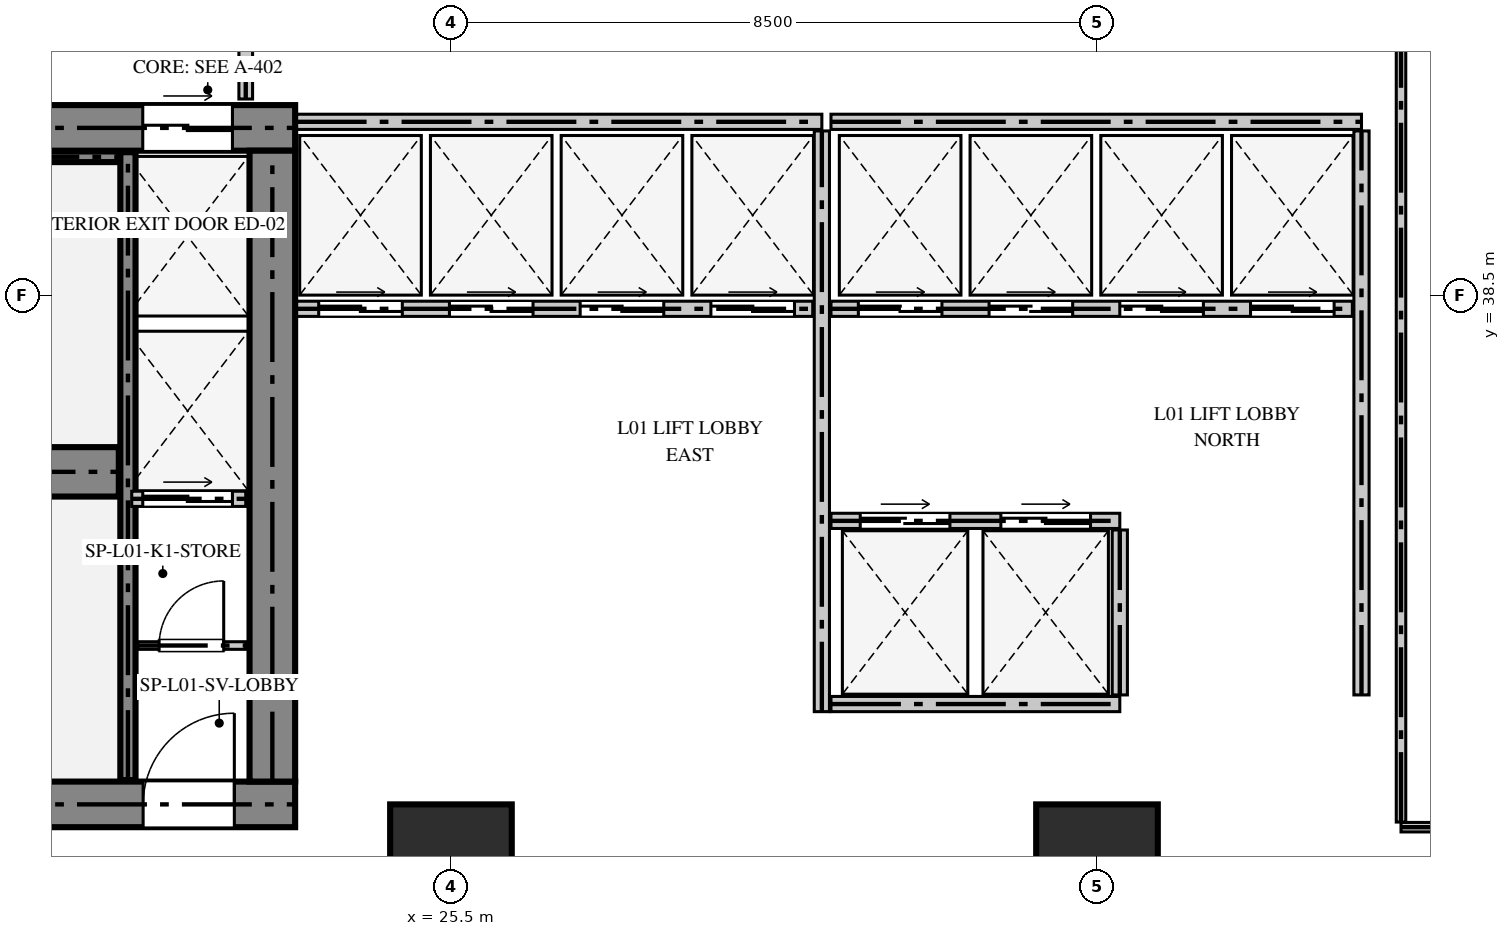
"""IFC4 building model, lengths in metres.
Left out: names, types, materials, properties, quantities, classifications, styles, units other than length and angle.
Written with IfcOpenShell. Run it as: python <this file> out.ifc"""

import sys

from ifc_helpers import new_model, si_unit, direction, frame, frame_2d, origin, origin_2d, place, context, subcontext, project, spatial, rectangle, extrude, element, fill, save


model = new_model("IFC4")
c1 = context("Model", 3, precision=1e-05, world=origin(), true_north=direction((0.0, 1.0)))
c2 = subcontext(c1, "Body", "Model", "MODEL_VIEW")
j1 = project(units=[si_unit("LENGTHUNIT", "METRE"), si_unit("PLANEANGLEUNIT", "RADIAN")], contexts=[c1])
p1 = place(None, origin())
s1 = spatial("IfcSite", under=j1, at=p1, CompositionType="ELEMENT")
p2 = place(p1, origin())
s2 = spatial("IfcBuilding", under=s1, at=p2, CompositionType="ELEMENT")
p3 = place(p2, origin())
s3 = spatial("IfcBuildingStorey", under=s2, at=p3, CompositionType="ELEMENT", Elevation=0.0)
p4 = place(p3, frame((5.4, 40.7, 0.0), z_axis=(0.0, 0.0, 1.0), x_axis=(1.0, 0.0, 0.0)))
e1 = element("IfcWall", 1, at=p4, inside=s3, PredefinedType="SHEAR", context=c2, shape_type="SweptSolid", body=[
    extrude(rectangle(XDim=18.05, YDim=0.6, at=frame_2d((9.025, 0.0))), origin(), (0.0, 0.0, 1.0), 5.4),
])
p5 = place(p4, frame((8.82, 0.0, 0.0)))
e2 = element("IfcOpeningElement", 2, at=p5, cuts=e1, PredefinedType="OPENING", context=c2, shape_type="SweptSolid", body=[
    extrude(rectangle(XDim=1.15, YDim=2.2, at=frame_2d((0.575, 1.1))), frame((0.0, 0.31, 0.0), z_axis=(0.0, -1.0, 0.0), x_axis=(1.0, 0.0, 0.0)), (0.0, 0.0, 1.0), 0.62),
])
p6 = place(p4, frame((16.045, 0.0, 0.0)))
e3 = element("IfcOpeningElement", 3, at=p6, cuts=e1, PredefinedType="OPENING", context=c2, shape_type="SweptSolid", body=[
    extrude(rectangle(XDim=1.18, YDim=2.25, at=frame_2d((0.59, 1.125))), frame((0.0, 0.31, 0.0), z_axis=(0.0, -1.0, 0.0), x_axis=(1.0, 0.0, 0.0)), (0.0, 0.0, 1.0), 0.62),
])
p7 = place(p3, frame((5.4, 31.8, 0.0), z_axis=(0.0, 0.0, 1.0), x_axis=(1.0, 0.0, 0.0)))
e4 = element("IfcWall", 4, at=p7, inside=s3, PredefinedType="SHEAR", context=c2, shape_type="SweptSolid", body=[
    extrude(rectangle(XDim=18.05, YDim=0.6, at=frame_2d((9.025, 0.0))), origin(), (0.0, 0.0, 1.0), 5.4),
])
p8 = place(p7, frame((3.25, 0.0, 0.0)))
e5 = element("IfcOpeningElement", 5, at=p8, cuts=e4, PredefinedType="OPENING", context=c2, shape_type="SweptSolid", body=[
    extrude(rectangle(XDim=1.2, YDim=2.2, at=frame_2d((0.6, 1.1))), frame((0.0, 0.31, 0.0), z_axis=(0.0, -1.0, 0.0), x_axis=(1.0, 0.0, 0.0)), (0.0, 0.0, 1.0), 0.62),
])
p9 = place(p7, frame((7.1, 0.0, 0.0)))
e6 = element("IfcOpeningElement", 6, at=p9, cuts=e4, PredefinedType="OPENING", context=c2, shape_type="SweptSolid", body=[
    extrude(rectangle(XDim=1.2, YDim=2.2, at=frame_2d((0.6, 1.1))), frame((0.0, 0.31, 0.0), z_axis=(0.0, -1.0, 0.0), x_axis=(1.0, 0.0, 0.0)), (0.0, 0.0, 1.0), 0.62),
])
p10 = place(p7, frame((8.95, 0.0, 0.0)))
e7 = element("IfcOpeningElement", 7, at=p10, cuts=e4, PredefinedType="OPENING", context=c2, shape_type="SweptSolid", body=[
    extrude(rectangle(XDim=1.15, YDim=2.2, at=frame_2d((0.575, 1.1))), frame((0.0, 0.31, 0.0), z_axis=(0.0, -1.0, 0.0), x_axis=(1.0, 0.0, 0.0)), (0.0, 0.0, 1.0), 0.62),
])
p11 = place(p7, frame((16.05, 0.0, 0.0)))
e8 = element("IfcOpeningElement", 8, at=p11, cuts=e4, PredefinedType="OPENING", context=c2, shape_type="SweptSolid", body=[
    extrude(rectangle(XDim=1.2, YDim=2.2, at=frame_2d((0.6, 1.1))), frame((0.0, 0.31, 0.0), z_axis=(0.0, -1.0, 0.0), x_axis=(1.0, 0.0, 0.0)), (0.0, 0.0, 1.0), 0.62),
])
p12 = place(p3, frame((23.15, 32.1, 0.0), z_axis=(0.0, 0.0, 1.0), x_axis=(0.0, 1.0, 0.0)))
e9 = element("IfcWall", 9, at=p12, inside=s3, PredefinedType="SHEAR", context=c2, shape_type="SweptSolid", body=[
    extrude(rectangle(XDim=8.3, YDim=0.6, at=frame_2d((4.15, 0.0))), origin(), (0.0, 0.0, 1.0), 5.4),
])
p13 = place(p3, frame((14.12, 36.175, 0.0), z_axis=(0.0, 0.0, 1.0), x_axis=(1.0, 0.0, 0.0)))
e10 = element("IfcWall", 10, at=p13, inside=s3, PredefinedType="SHEAR", context=c2, shape_type="SweptSolid", body=[
    extrude(rectangle(XDim=7.01, YDim=0.65, at=frame_2d((3.505, 0.0))), origin(), (0.0, 0.0, 1.0), 5.4),
])
p14 = place(p3, frame((21.25, 32.12, 0.0), z_axis=(0.0, 0.0, 1.0), x_axis=(0.0, 1.0, 0.0)))
e11 = element("IfcWall", 11, at=p14, inside=s3, PredefinedType="SHEAR", context=c2, shape_type="SweptSolid", body=[
    extrude(rectangle(XDim=8.26, YDim=0.2, at=frame_2d((4.13, 0.0))), origin(), (0.0, 0.0, 1.0), 5.4),
])
p15 = place(p3, frame((15.55, 40.32, 0.0), z_axis=(0.0, 0.0, 1.0), x_axis=(1.0, 0.0, 0.0)))
e12 = element("IfcWall", 12, at=p15, inside=s3, PredefinedType="SHEAR", context=c2, shape_type="SweptSolid", body=[
    extrude(rectangle(XDim=5.58, YDim=0.14, at=frame_2d((2.79, 0.0))), origin(), (0.0, 0.0, 1.0), 5.4),
])
for number, where, z_axis, x_axis in (
    (13, (25.5, 31.0, 0.0), (0.0, 0.0, 1.0), (1.0, 0.0, 0.0)),
    (14, (34.0, 31.0, 0.0), (0.0, 0.0, 1.0), (1.0, 0.0, 0.0)),
):
    element("IfcColumn", number, at=place(p3, frame(where, z_axis=z_axis, x_axis=x_axis)), inside=s3, PredefinedType="COLUMN", context=c2, shape_type="SweptSolid", body=[
        extrude(rectangle(XDim=1.6, YDim=1.6, at=origin_2d()), origin(), (0.0, 0.0, 1.0), 5.4),
    ])
p16 = place(p3, frame((21.38, 33.89, 0.0), z_axis=(0.0, 0.0, 1.0), x_axis=(1.0, 0.0, 0.0)))
e15 = element("IfcWall", 15, at=p16, inside=s3, PredefinedType="PARTITIONING", context=c2, shape_type="SweptSolid", body=[
    extrude(rectangle(XDim=1.42, YDim=0.1, at=frame_2d((0.71, 0.0))), origin(), (0.0, 0.0, 1.0), 5.08),
])
p17 = place(p16, frame((0.28, 0.0, 0.0)))
e16 = element("IfcOpeningElement", 16, at=p17, cuts=e15, PredefinedType="OPENING", context=c2, shape_type="SweptSolid", body=[
    extrude(rectangle(XDim=0.85, YDim=2.1, at=frame_2d((0.425, 1.05))), frame((0.0, 0.06, 0.0), z_axis=(0.0, -1.0, 0.0), x_axis=(1.0, 0.0, 0.0)), (0.0, 0.0, 1.0), 0.12),
])
p18 = place(p3, frame((21.3, 35.82, 0.0), z_axis=(0.0, 0.0, 1.0), x_axis=(1.0, 0.0, 0.0)))
e17 = element("IfcWall", 17, at=p18, inside=s3, PredefinedType="PARTITIONING", context=c2, shape_type="SweptSolid", body=[
    extrude(rectangle(XDim=1.5, YDim=0.2, at=frame_2d((0.75, 0.0))), origin(), (0.0, 0.0, 1.0), 5.08),
])
p19 = place(p18, frame((0.145, 0.0, 0.0)))
e18 = element("IfcOpeningElement", 18, at=p19, cuts=e17, PredefinedType="OPENING", context=c2, shape_type="SweptSolid", body=[
    extrude(rectangle(XDim=1.18, YDim=2.25, at=frame_2d((0.59, 1.125))), frame((0.0, 0.11, 0.0), z_axis=(0.0, -1.0, 0.0), x_axis=(1.0, 0.0, 0.0)), (0.0, 0.0, 1.0), 0.22),
])
p20 = place(p3, frame((23.47, 40.78, 0.0), z_axis=(0.0, 0.0, 1.0), x_axis=(1.0, 0.0, 0.0)))
e19 = element("IfcWall", 19, at=p20, inside=s3, PredefinedType="PARTITIONING", context=c2, shape_type="SweptSolid", body=[
    extrude(rectangle(XDim=6.91, YDim=0.2, at=frame_2d((3.455, 0.0))), origin(), (0.0, 0.0, 1.0), 5.08),
])
p21 = place(p3, frame((30.38, 33.02, 0.0), z_axis=(0.0, 0.0, 1.0), x_axis=(0.0, 1.0, 0.0)))
e20 = element("IfcWall", 20, at=p21, inside=s3, PredefinedType="PARTITIONING", context=c2, shape_type="SweptSolid", body=[
    extrude(rectangle(XDim=7.64, YDim=0.2, at=frame_2d((3.82, 0.0))), origin(), (0.0, 0.0, 1.0), 5.08),
])
p22 = place(p3, frame((23.47, 38.32, 0.0), z_axis=(0.0, 0.0, 1.0), x_axis=(1.0, 0.0, 0.0)))
e21 = element("IfcWall", 21, at=p22, inside=s3, PredefinedType="PARTITIONING", context=c2, shape_type="SweptSolid", body=[
    extrude(rectangle(XDim=6.79, YDim=0.2, at=frame_2d((3.395, 0.0))), origin(), (0.0, 0.0, 1.0), 5.08),
])
p23 = place(p22, frame((0.29, 0.0, 0.0)))
e22 = element("IfcOpeningElement", 22, at=p23, cuts=e21, PredefinedType="OPENING", context=c2, shape_type="SweptSolid", body=[
    extrude(rectangle(XDim=1.1, YDim=2.2, at=frame_2d((0.55, 1.1))), frame((0.0, 0.11, 0.0), z_axis=(0.0, -1.0, 0.0), x_axis=(1.0, 0.0, 0.0)), (0.0, 0.0, 1.0), 0.22),
])
p24 = place(p22, frame((2.01, 0.0, 0.0)))
e23 = element("IfcOpeningElement", 23, at=p24, cuts=e21, PredefinedType="OPENING", context=c2, shape_type="SweptSolid", body=[
    extrude(rectangle(XDim=1.1, YDim=2.2, at=frame_2d((0.55, 1.1))), frame((0.0, 0.11, 0.0), z_axis=(0.0, -1.0, 0.0), x_axis=(1.0, 0.0, 0.0)), (0.0, 0.0, 1.0), 0.22),
])
p25 = place(p22, frame((3.73, 0.0, 0.0)))
e24 = element("IfcOpeningElement", 24, at=p25, cuts=e21, PredefinedType="OPENING", context=c2, shape_type="SweptSolid", body=[
    extrude(rectangle(XDim=1.1, YDim=2.2, at=frame_2d((0.55, 1.1))), frame((0.0, 0.11, 0.0), z_axis=(0.0, -1.0, 0.0), x_axis=(1.0, 0.0, 0.0)), (0.0, 0.0, 1.0), 0.22),
])
p26 = place(p22, frame((5.45, 0.0, 0.0)))
e25 = element("IfcOpeningElement", 25, at=p26, cuts=e21, PredefinedType="OPENING", context=c2, shape_type="SweptSolid", body=[
    extrude(rectangle(XDim=1.1, YDim=2.2, at=frame_2d((0.55, 1.1))), frame((0.0, 0.11, 0.0), z_axis=(0.0, -1.0, 0.0), x_axis=(1.0, 0.0, 0.0)), (0.0, 0.0, 1.0), 0.22),
])
p27 = place(p3, frame((30.5, 40.78, 0.0), z_axis=(0.0, 0.0, 1.0), x_axis=(1.0, 0.0, 0.0)))
e26 = element("IfcWall", 26, at=p27, inside=s3, PredefinedType="PARTITIONING", context=c2, shape_type="SweptSolid", body=[
    extrude(rectangle(XDim=6.98, YDim=0.2, at=frame_2d((3.49, 0.0))), origin(), (0.0, 0.0, 1.0), 5.08),
])
p28 = place(p3, frame((37.48, 33.24, 0.0), z_axis=(0.0, 0.0, 1.0), x_axis=(0.0, 1.0, 0.0)))
e27 = element("IfcWall", 27, at=p28, inside=s3, PredefinedType="PARTITIONING", context=c2, shape_type="SweptSolid", body=[
    extrude(rectangle(XDim=7.42, YDim=0.2, at=frame_2d((3.71, 0.0))), origin(), (0.0, 0.0, 1.0), 5.08),
])
p29 = place(p3, frame((30.5, 38.32, 0.0), z_axis=(0.0, 0.0, 1.0), x_axis=(1.0, 0.0, 0.0)))
e28 = element("IfcWall", 28, at=p29, inside=s3, PredefinedType="PARTITIONING", context=c2, shape_type="SweptSolid", body=[
    extrude(rectangle(XDim=6.86, YDim=0.2, at=frame_2d((3.43, 0.0))), origin(), (0.0, 0.0, 1.0), 5.08),
])
p30 = place(p29, frame((0.36, 0.0, 0.0)))
e29 = element("IfcOpeningElement", 29, at=p30, cuts=e28, PredefinedType="OPENING", context=c2, shape_type="SweptSolid", body=[
    extrude(rectangle(XDim=1.1, YDim=2.2, at=frame_2d((0.55, 1.1))), frame((0.0, 0.11, 0.0), z_axis=(0.0, -1.0, 0.0), x_axis=(1.0, 0.0, 0.0)), (0.0, 0.0, 1.0), 0.22),
])
p31 = place(p29, frame((2.08, 0.0, 0.0)))
e30 = element("IfcOpeningElement", 30, at=p31, cuts=e28, PredefinedType="OPENING", context=c2, shape_type="SweptSolid", body=[
    extrude(rectangle(XDim=1.1, YDim=2.2, at=frame_2d((0.55, 1.1))), frame((0.0, 0.11, 0.0), z_axis=(0.0, -1.0, 0.0), x_axis=(1.0, 0.0, 0.0)), (0.0, 0.0, 1.0), 0.22),
])
p32 = place(p29, frame((3.8, 0.0, 0.0)))
e31 = element("IfcOpeningElement", 31, at=p32, cuts=e28, PredefinedType="OPENING", context=c2, shape_type="SweptSolid", body=[
    extrude(rectangle(XDim=1.1, YDim=2.2, at=frame_2d((0.55, 1.1))), frame((0.0, 0.11, 0.0), z_axis=(0.0, -1.0, 0.0), x_axis=(1.0, 0.0, 0.0)), (0.0, 0.0, 1.0), 0.22),
])
p33 = place(p29, frame((5.52, 0.0, 0.0)))
e32 = element("IfcOpeningElement", 32, at=p33, cuts=e28, PredefinedType="OPENING", context=c2, shape_type="SweptSolid", body=[
    extrude(rectangle(XDim=1.1, YDim=2.2, at=frame_2d((0.55, 1.1))), frame((0.0, 0.11, 0.0), z_axis=(0.0, -1.0, 0.0), x_axis=(1.0, 0.0, 0.0)), (0.0, 0.0, 1.0), 0.22),
])
p34 = place(p3, frame((30.5, 35.53, 0.0), z_axis=(0.0, 0.0, 1.0), x_axis=(1.0, 0.0, 0.0)))
e33 = element("IfcWall", 33, at=p34, inside=s3, PredefinedType="PARTITIONING", context=c2, shape_type="SweptSolid", body=[
    extrude(rectangle(XDim=3.8, YDim=0.2, at=frame_2d((1.9, 0.0))), origin(), (0.0, 0.0, 1.0), 5.08),
])
p35 = place(p34, frame((0.385, 0.0, 0.0)))
e34 = element("IfcOpeningElement", 34, at=p35, cuts=e33, PredefinedType="OPENING", context=c2, shape_type="SweptSolid", body=[
    extrude(rectangle(XDim=1.18, YDim=2.25, at=frame_2d((0.59, 1.125))), frame((0.0, 0.11, 0.0), z_axis=(0.0, -1.0, 0.0), x_axis=(1.0, 0.0, 0.0)), (0.0, 0.0, 1.0), 0.22),
])
p36 = place(p34, frame((2.235, 0.0, 0.0)))
e35 = element("IfcOpeningElement", 35, at=p36, cuts=e33, PredefinedType="OPENING", context=c2, shape_type="SweptSolid", body=[
    extrude(rectangle(XDim=1.18, YDim=2.25, at=frame_2d((0.59, 1.125))), frame((0.0, 0.11, 0.0), z_axis=(0.0, -1.0, 0.0), x_axis=(1.0, 0.0, 0.0)), (0.0, 0.0, 1.0), 0.22),
])
p37 = place(p3, frame((30.5, 33.12, 0.0), z_axis=(0.0, 0.0, 1.0), x_axis=(1.0, 0.0, 0.0)))
e36 = element("IfcWall", 36, at=p37, inside=s3, PredefinedType="PARTITIONING", context=c2, shape_type="SweptSolid", body=[
    extrude(rectangle(XDim=3.8, YDim=0.2, at=frame_2d((1.9, 0.0))), origin(), (0.0, 0.0, 1.0), 5.08),
])
p38 = place(p3, frame((34.3, 33.24, 0.0), z_axis=(0.0, 0.0, 1.0), x_axis=(0.0, 1.0, 0.0)))
e37 = element("IfcWall", 37, at=p38, inside=s3, PredefinedType="PARTITIONING", context=c2, shape_type="SweptSolid", body=[
    extrude(rectangle(XDim=2.17, YDim=0.2, at=frame_2d((1.085, 0.0))), origin(), (0.0, 0.0, 1.0), 5.08),
])
p39 = place(p3, frame((22.8, 45.675, 0.0), z_axis=(0.0, 0.0, 1.0), x_axis=(0.0, -1.0, 0.0)))
e38 = element("IfcWall", 38, at=p39, inside=s3, PredefinedType="PARTITIONING", context=c2, shape_type="SweptSolid", body=[
    extrude(rectangle(XDim=4.595, YDim=0.18, at=frame_2d((2.297, 0.0))), origin(), (0.0, 0.0, 1.0), 5.08),
])
p40 = place(p3, frame((41.675, 31.5, 0.0), z_axis=(0.0, 0.0, 1.0), x_axis=(-1.0, 0.0, 0.0)))
e39 = element("IfcWall", 39, at=p40, inside=s3, PredefinedType="PARTITIONING", context=c2, shape_type="SweptSolid", body=[
    extrude(rectangle(XDim=3.675, YDim=0.125, at=frame_2d((1.837, 0.0))), origin(), (0.0, 0.0, 1.0), 5.08),
])
p41 = place(p3, frame((38.0, 31.567, 0.0), z_axis=(0.0, 0.0, 1.0), x_axis=(0.0, 1.0, 0.0)))
e40 = element("IfcWall", 40, at=p41, inside=s3, PredefinedType="PARTITIONING", context=c2, shape_type="SweptSolid", body=[
    extrude(rectangle(XDim=14.108, YDim=0.125, at=frame_2d((7.054, 0.0))), origin(), (0.0, 0.0, 1.0), 5.08),
])
p42 = place(p11, origin())
e41 = element("IfcDoor", 41, at=p42, inside=s3, OperationType="SINGLE_SWING_RIGHT", PredefinedType="DOOR", context=c2, shape_type="SweptSolid", body=[
    extrude(rectangle(XDim=1.2, YDim=2.2, at=frame_2d((0.6, 1.1))), frame((0.0, 0.025, 0.0), z_axis=(0.0, -1.0, 0.0), x_axis=(1.0, 0.0, 0.0)), (0.0, 0.0, 1.0), 0.05),
])
fill(e8, e41)
p43 = place(p17, origin())
e42 = element("IfcDoor", 42, at=p43, inside=s3, OperationType="SINGLE_SWING_RIGHT", PredefinedType="DOOR", context=c2, shape_type="SweptSolid", body=[
    extrude(rectangle(XDim=0.85, YDim=2.1, at=frame_2d((0.425, 1.05))), frame((0.0, 0.025, 0.0), z_axis=(0.0, -1.0, 0.0), x_axis=(1.0, 0.0, 0.0)), (0.0, 0.0, 1.0), 0.05),
])
fill(e16, e42)
p44 = place(p6, origin())
e43 = element("IfcDoor", 43, at=p44, inside=s3, OperationType="DOUBLE_DOOR_SLIDING", PredefinedType="DOOR", context=c2, shape_type="SweptSolid", body=[
    extrude(rectangle(XDim=1.18, YDim=2.25, at=frame_2d((0.59, 1.125))), frame((0.0, 0.025, 0.0), z_axis=(0.0, -1.0, 0.0), x_axis=(1.0, 0.0, 0.0)), (0.0, 0.0, 1.0), 0.05),
])
fill(e3, e43)
p45 = place(p19, origin())
e44 = element("IfcDoor", 44, at=p45, inside=s3, OperationType="DOUBLE_DOOR_SLIDING", PredefinedType="DOOR", context=c2, shape_type="SweptSolid", body=[
    extrude(rectangle(XDim=1.18, YDim=2.25, at=frame_2d((0.59, 1.125))), frame((0.0, 0.025, 0.0), z_axis=(0.0, -1.0, 0.0), x_axis=(1.0, 0.0, 0.0)), (0.0, 0.0, 1.0), 0.05),
])
fill(e18, e44)
p46 = place(p23, origin())
e45 = element("IfcDoor", 45, at=p46, inside=s3, OperationType="DOUBLE_DOOR_SLIDING", PredefinedType="DOOR", context=c2, shape_type="SweptSolid", body=[
    extrude(rectangle(XDim=1.1, YDim=2.2, at=frame_2d((0.55, 1.1))), frame((0.0, 0.025, 0.0), z_axis=(0.0, -1.0, 0.0), x_axis=(1.0, 0.0, 0.0)), (0.0, 0.0, 1.0), 0.05),
])
fill(e22, e45)
p47 = place(p24, origin())
e46 = element("IfcDoor", 46, at=p47, inside=s3, OperationType="DOUBLE_DOOR_SLIDING", PredefinedType="DOOR", context=c2, shape_type="SweptSolid", body=[
    extrude(rectangle(XDim=1.1, YDim=2.2, at=frame_2d((0.55, 1.1))), frame((0.0, 0.025, 0.0), z_axis=(0.0, -1.0, 0.0), x_axis=(1.0, 0.0, 0.0)), (0.0, 0.0, 1.0), 0.05),
])
fill(e23, e46)
p48 = place(p25, origin())
e47 = element("IfcDoor", 47, at=p48, inside=s3, OperationType="DOUBLE_DOOR_SLIDING", PredefinedType="DOOR", context=c2, shape_type="SweptSolid", body=[
    extrude(rectangle(XDim=1.1, YDim=2.2, at=frame_2d((0.55, 1.1))), frame((0.0, 0.025, 0.0), z_axis=(0.0, -1.0, 0.0), x_axis=(1.0, 0.0, 0.0)), (0.0, 0.0, 1.0), 0.05),
])
fill(e24, e47)
p49 = place(p26, origin())
e48 = element("IfcDoor", 48, at=p49, inside=s3, OperationType="DOUBLE_DOOR_SLIDING", PredefinedType="DOOR", context=c2, shape_type="SweptSolid", body=[
    extrude(rectangle(XDim=1.1, YDim=2.2, at=frame_2d((0.55, 1.1))), frame((0.0, 0.025, 0.0), z_axis=(0.0, -1.0, 0.0), x_axis=(1.0, 0.0, 0.0)), (0.0, 0.0, 1.0), 0.05),
])
fill(e25, e48)
p50 = place(p30, origin())
e49 = element("IfcDoor", 49, at=p50, inside=s3, OperationType="DOUBLE_DOOR_SLIDING", PredefinedType="DOOR", context=c2, shape_type="SweptSolid", body=[
    extrude(rectangle(XDim=1.1, YDim=2.2, at=frame_2d((0.55, 1.1))), frame((0.0, 0.025, 0.0), z_axis=(0.0, -1.0, 0.0), x_axis=(1.0, 0.0, 0.0)), (0.0, 0.0, 1.0), 0.05),
])
fill(e29, e49)
p51 = place(p31, origin())
e50 = element("IfcDoor", 50, at=p51, inside=s3, OperationType="DOUBLE_DOOR_SLIDING", PredefinedType="DOOR", context=c2, shape_type="SweptSolid", body=[
    extrude(rectangle(XDim=1.1, YDim=2.2, at=frame_2d((0.55, 1.1))), frame((0.0, 0.025, 0.0), z_axis=(0.0, -1.0, 0.0), x_axis=(1.0, 0.0, 0.0)), (0.0, 0.0, 1.0), 0.05),
])
fill(e30, e50)
p52 = place(p32, origin())
e51 = element("IfcDoor", 51, at=p52, inside=s3, OperationType="DOUBLE_DOOR_SLIDING", PredefinedType="DOOR", context=c2, shape_type="SweptSolid", body=[
    extrude(rectangle(XDim=1.1, YDim=2.2, at=frame_2d((0.55, 1.1))), frame((0.0, 0.025, 0.0), z_axis=(0.0, -1.0, 0.0), x_axis=(1.0, 0.0, 0.0)), (0.0, 0.0, 1.0), 0.05),
])
fill(e31, e51)
p53 = place(p33, origin())
e52 = element("IfcDoor", 52, at=p53, inside=s3, OperationType="DOUBLE_DOOR_SLIDING", PredefinedType="DOOR", context=c2, shape_type="SweptSolid", body=[
    extrude(rectangle(XDim=1.1, YDim=2.2, at=frame_2d((0.55, 1.1))), frame((0.0, 0.025, 0.0), z_axis=(0.0, -1.0, 0.0), x_axis=(1.0, 0.0, 0.0)), (0.0, 0.0, 1.0), 0.05),
])
fill(e32, e52)
p54 = place(p35, origin())
e53 = element("IfcDoor", 53, at=p54, inside=s3, OperationType="DOUBLE_DOOR_SLIDING", PredefinedType="DOOR", context=c2, shape_type="SweptSolid", body=[
    extrude(rectangle(XDim=1.18, YDim=2.25, at=frame_2d((0.59, 1.125))), frame((0.0, 0.025, 0.0), z_axis=(0.0, -1.0, 0.0), x_axis=(1.0, 0.0, 0.0)), (0.0, 0.0, 1.0), 0.05),
])
fill(e34, e53)
p55 = place(p36, origin())
e54 = element("IfcDoor", 54, at=p55, inside=s3, OperationType="DOUBLE_DOOR_SLIDING", PredefinedType="DOOR", context=c2, shape_type="SweptSolid", body=[
    extrude(rectangle(XDim=1.18, YDim=2.25, at=frame_2d((0.59, 1.125))), frame((0.0, 0.025, 0.0), z_axis=(0.0, -1.0, 0.0), x_axis=(1.0, 0.0, 0.0)), (0.0, 0.0, 1.0), 0.05),
])
fill(e35, e54)
save(model, sys.argv[1])
